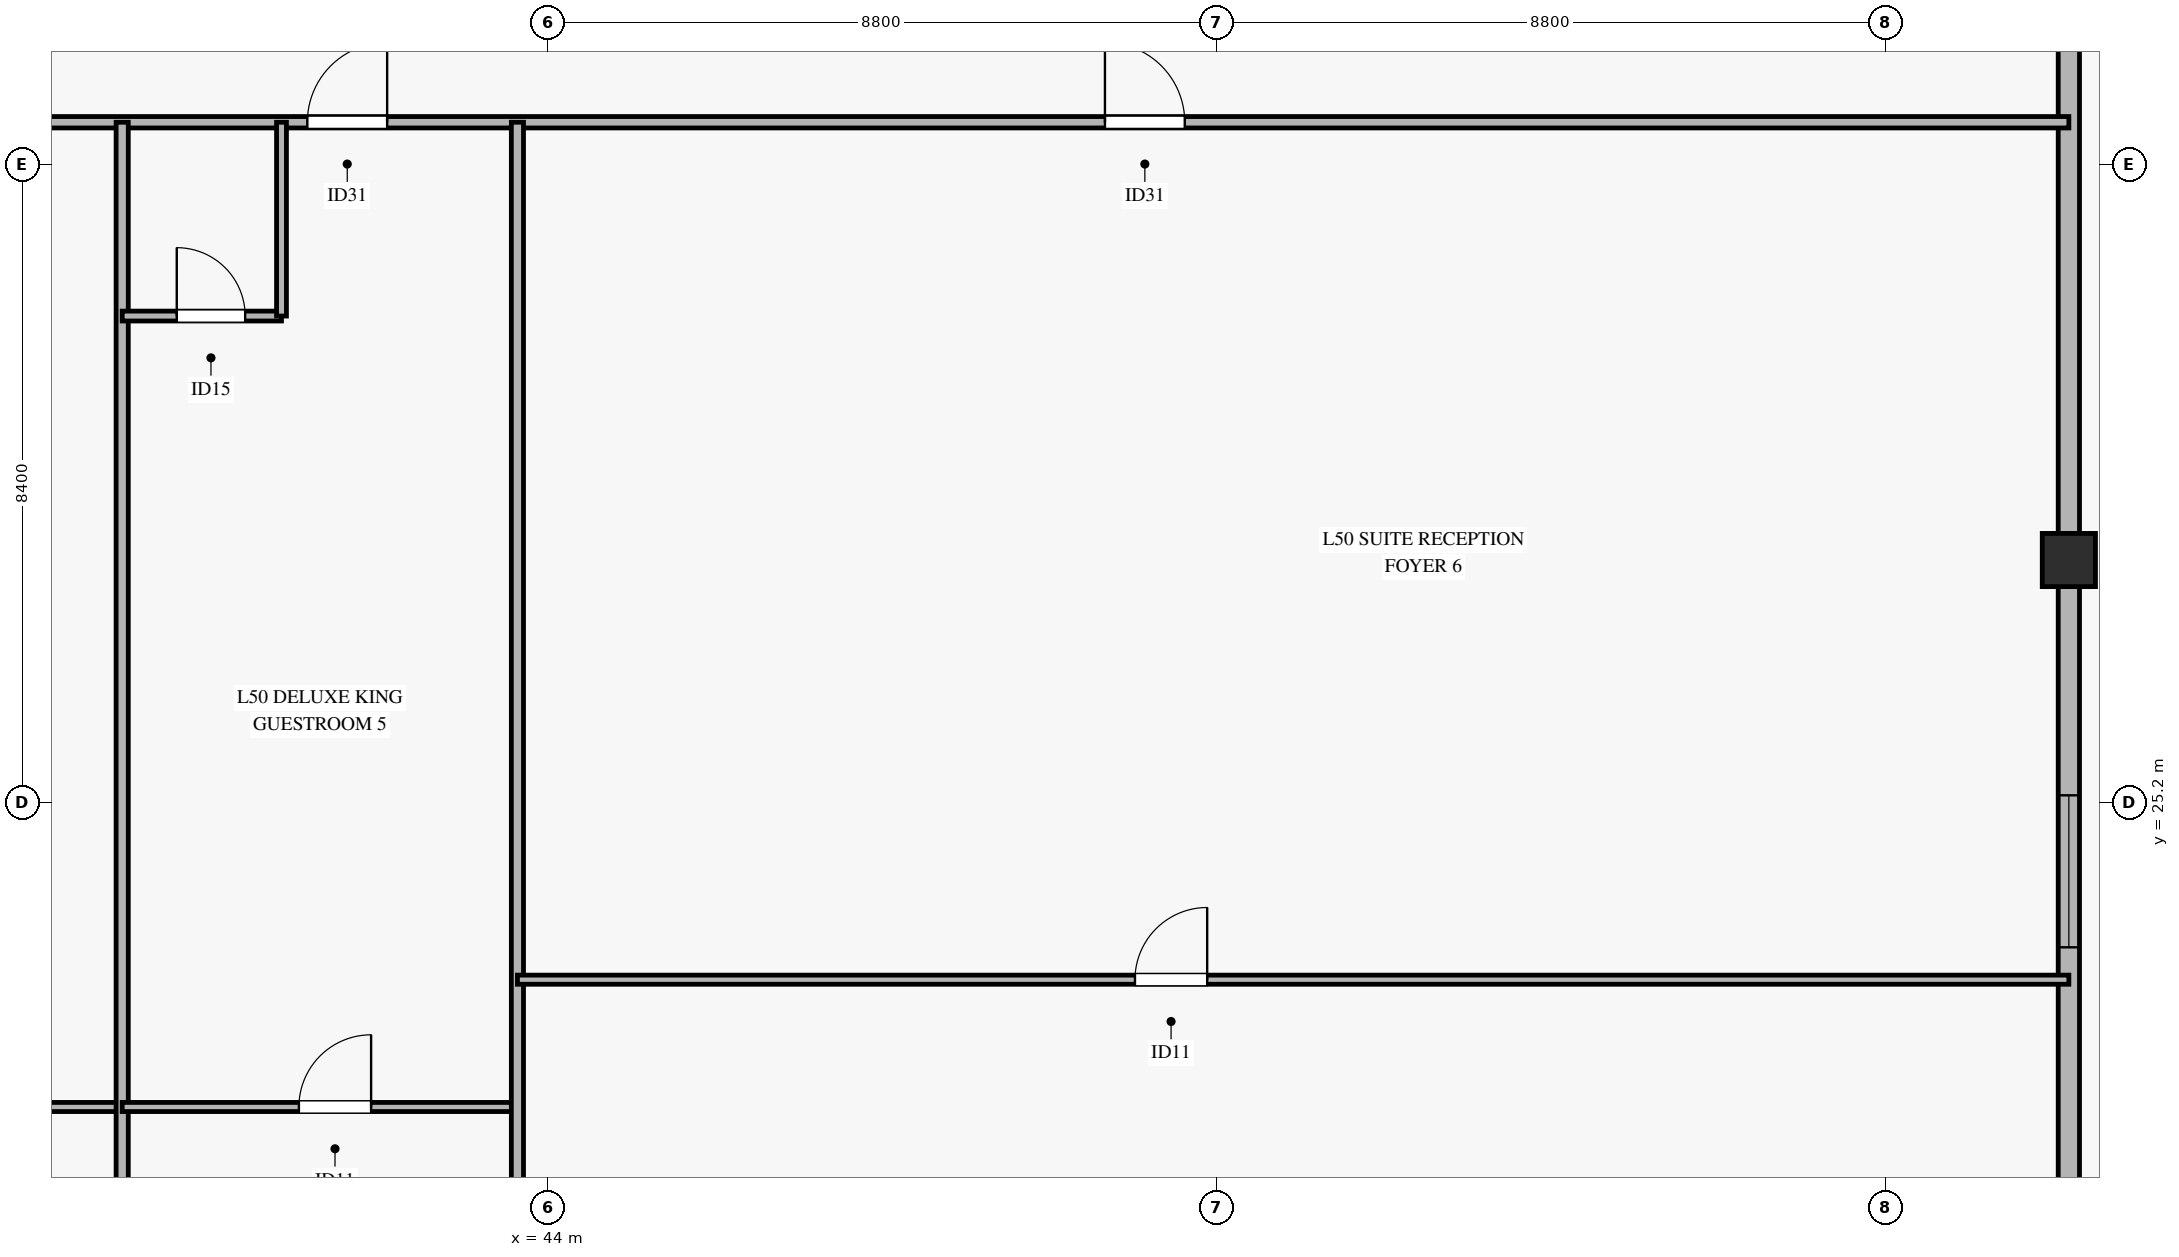
"""IFC4 building model, lengths in metres.
Left out: names, types, materials, properties, quantities, classifications, styles, units other than length and angle.
Written with IfcOpenShell. Run it as: python <this file> out.ifc"""

import sys

from ifc_helpers import new_model, si_unit, direction, frame, frame_2d, origin, origin_2d, place, context, subcontext, project, spatial, rectangle, hollow_rectangle, extrude, source, transform, mapped, element, fill, save


model = new_model("IFC4")
c1 = context("Model", 3, precision=1e-05, world=origin(), true_north=direction((0.0, 1.0)))
c2 = subcontext(c1, "Body", "Model", "MODEL_VIEW")
j1 = project(units=[si_unit("LENGTHUNIT", "METRE"), si_unit("PLANEANGLEUNIT", "RADIAN")], contexts=[c1])
p1 = place(None, origin())
s1 = spatial("IfcSite", under=j1, at=p1, CompositionType="ELEMENT")
p2 = place(p1, origin())
s2 = spatial("IfcBuilding", under=s1, at=p2, CompositionType="ELEMENT")
p3 = place(p2, frame((0.0, 0.0, 199.2)))
s3 = spatial("IfcBuildingStorey", under=s2, at=p3, CompositionType="ELEMENT", Elevation=199.2)
m1 = source(origin(), c2, "Body", "SweptSolid", [
    extrude(hollow_rectangle(XDim=0.7, YDim=0.7, WallThickness=0.032, at=origin_2d()), origin(), (0.0, 0.0, 1.0), 3.304),
])
p4 = place(p3, frame((64.012, 28.39, 0.0), z_axis=(-0.095026488821, 0.106849380121, 0.989723787928), x_axis=(-0.747238227779, -0.664556266199, 0.0)))
e1 = element("IfcColumn", 1, at=p4, inside=s3, PredefinedType="COLUMN", context=c2, shape_type="MappedRepresentation", body=[
    mapped(m1, transform((0.0, 0.0, 0.0), x_axis=(1.0, 0.0, 0.0), y_axis=(0.0, 1.0, 0.0), z_axis=(0.0, 0.0, 1.0), scale=1.0)),
])
p5 = place(p3, frame((64.012, 13.515, 0.0), z_axis=(0.0, 0.0, 1.0), x_axis=(0.0, 1.0, 0.0)))
e2 = element("IfcWall", 2, at=p5, inside=s3, PredefinedType="SOLIDWALL", context=c2, shape_type="SweptSolid", body=[
    extrude(rectangle(XDim=14.525, YDim=0.28, at=frame_2d((7.263, 0.0))), origin(), (0.0, 0.0, 1.0), 2.75),
])
p6 = place(p5, frame((3.017, 0.0, 0.45)))
e3 = element("IfcOpeningElement", 3, at=p6, cuts=e2, PredefinedType="OPENING", context=c2, shape_type="SweptSolid", body=[
    extrude(rectangle(XDim=2.0, YDim=2.0, at=frame_2d((1.0, 1.0))), frame((0.0, 0.15, 0.0), z_axis=(0.0, -1.0, 0.0), x_axis=(1.0, 0.0, 0.0)), (0.0, 0.0, 1.0), 0.3),
])
p7 = place(p5, frame((9.779, 0.0, 0.45)))
e4 = element("IfcOpeningElement", 4, at=p7, cuts=e2, PredefinedType="OPENING", context=c2, shape_type="SweptSolid", body=[
    extrude(rectangle(XDim=2.0, YDim=2.0, at=frame_2d((1.0, 1.0))), frame((0.0, 0.15, 0.0), z_axis=(0.0, -1.0, 0.0), x_axis=(1.0, 0.0, 0.0)), (0.0, 0.0, 1.0), 0.3),
])
p8 = place(p3, frame((64.012, 28.74, 0.0), z_axis=(0.0, 0.0, 1.0), x_axis=(0.0, 1.0, 0.0)))
e5 = element("IfcWall", 5, at=p8, inside=s3, PredefinedType="SOLIDWALL", context=c2, shape_type="SweptSolid", body=[
    extrude(rectangle(XDim=14.525, YDim=0.28, at=frame_2d((7.262, 0.0))), origin(), (0.0, 0.0, 1.0), 2.75),
])
p9 = place(p8, frame((9.115, 0.0, 0.45)))
e6 = element("IfcOpeningElement", 6, at=p9, cuts=e5, PredefinedType="OPENING", context=c2, shape_type="SweptSolid", body=[
    extrude(rectangle(XDim=2.0, YDim=2.0, at=frame_2d((1.0, 1.0))), frame((0.0, 0.15, 0.0), z_axis=(0.0, -1.0, 0.0), x_axis=(1.0, 0.0, 0.0)), (0.0, 0.0, 1.0), 0.3),
])
p10 = place(p3, frame((6.389, 34.15, 0.0), z_axis=(0.0, 0.0, 1.0), x_axis=(1.0, 0.0, 0.0)))
e7 = element("IfcWall", 7, at=p10, inside=s3, PredefinedType="PARTITIONING", context=c2, shape_type="SweptSolid", body=[
    extrude(rectangle(XDim=57.623, YDim=0.15, at=frame_2d((28.812, 0.0))), origin(), (0.0, 0.0, 1.0), 2.455),
])
p11 = place(p10, frame((6.344, 0.0, 0.0)))
e8 = element("IfcOpeningElement", 8, at=p11, cuts=e7, PredefinedType="OPENING", context=c2, shape_type="SweptSolid", body=[
    extrude(rectangle(XDim=1.05, YDim=2.15, at=frame_2d((0.525, 1.075))), frame((0.0, 0.085, 0.0), z_axis=(0.0, -1.0, 0.0), x_axis=(1.0, 0.0, 0.0)), (0.0, 0.0, 1.0), 0.17),
])
p12 = place(p10, frame((17.936, 0.0, 0.0)))
e9 = element("IfcOpeningElement", 9, at=p12, cuts=e7, PredefinedType="OPENING", context=c2, shape_type="SweptSolid", body=[
    extrude(rectangle(XDim=1.05, YDim=2.15, at=frame_2d((0.525, 1.075))), frame((0.0, 0.085, 0.0), z_axis=(0.0, -1.0, 0.0), x_axis=(1.0, 0.0, 0.0)), (0.0, 0.0, 1.0), 0.17),
])
p13 = place(p10, frame((23.756, 0.0, 0.0)))
e10 = element("IfcOpeningElement", 10, at=p13, cuts=e7, PredefinedType="OPENING", context=c2, shape_type="SweptSolid", body=[
    extrude(rectangle(XDim=1.05, YDim=2.15, at=frame_2d((0.525, 1.075))), frame((0.0, 0.085, 0.0), z_axis=(0.0, -1.0, 0.0), x_axis=(1.0, 0.0, 0.0)), (0.0, 0.0, 1.0), 0.17),
])
p14 = place(p10, frame((29.247, 0.0, 0.0)))
e11 = element("IfcOpeningElement", 11, at=p14, cuts=e7, PredefinedType="OPENING", context=c2, shape_type="SweptSolid", body=[
    extrude(rectangle(XDim=1.05, YDim=2.15, at=frame_2d((0.525, 1.075))), frame((0.0, 0.085, 0.0), z_axis=(0.0, -1.0, 0.0), x_axis=(1.0, 0.0, 0.0)), (0.0, 0.0, 1.0), 0.17),
])
p15 = place(p10, frame((34.447, 0.0, 0.0)))
e12 = element("IfcOpeningElement", 12, at=p15, cuts=e7, PredefinedType="OPENING", context=c2, shape_type="SweptSolid", body=[
    extrude(rectangle(XDim=1.05, YDim=2.15, at=frame_2d((0.525, 1.075))), frame((0.0, 0.085, 0.0), z_axis=(0.0, -1.0, 0.0), x_axis=(1.0, 0.0, 0.0)), (0.0, 0.0, 1.0), 0.17),
])
p16 = place(p10, frame((44.941, 0.0, 0.0)))
e13 = element("IfcOpeningElement", 13, at=p16, cuts=e7, PredefinedType="OPENING", context=c2, shape_type="SweptSolid", body=[
    extrude(rectangle(XDim=1.05, YDim=2.15, at=frame_2d((0.525, 1.075))), frame((0.0, 0.085, 0.0), z_axis=(0.0, -1.0, 0.0), x_axis=(1.0, 0.0, 0.0)), (0.0, 0.0, 1.0), 0.17),
])
p17 = place(p3, frame((33.2, 21.193, 0.0), z_axis=(0.0, 0.0, 1.0), x_axis=(1.0, 0.0, 0.0)))
e14 = element("IfcWall", 14, at=p17, inside=s3, PredefinedType="PARTITIONING", context=c2, shape_type="SweptSolid", body=[
    extrude(rectangle(XDim=5.2, YDim=0.12, at=frame_2d((2.6, 0.0))), origin(), (0.0, 0.0, 1.0), 2.455),
])
p18 = place(p17, frame((2.325, 0.0, 0.0)))
e15 = element("IfcOpeningElement", 15, at=p18, cuts=e14, PredefinedType="OPENING", context=c2, shape_type="SweptSolid", body=[
    extrude(rectangle(XDim=0.95, YDim=2.1, at=frame_2d((0.475, 1.05))), frame((0.0, 0.07, 0.0), z_axis=(0.0, -1.0, 0.0), x_axis=(1.0, 0.0, 0.0)), (0.0, 0.0, 1.0), 0.14),
])
p19 = place(p3, frame((38.4, 10.68, 0.0), z_axis=(0.0, 0.0, 1.0), x_axis=(0.0, 1.0, 0.0)))
e16 = element("IfcWall", 16, at=p19, inside=s3, PredefinedType="PARTITIONING", context=c2, shape_type="SweptSolid", body=[
    extrude(rectangle(XDim=23.47, YDim=0.16, at=frame_2d((11.735, 0.0))), origin(), (0.0, 0.0, 1.0), 2.755),
])
p20 = place(p3, frame((38.4, 31.6, 0.0), z_axis=(0.0, 0.0, 1.0), x_axis=(1.0, 0.0, 0.0)))
e17 = element("IfcWall", 17, at=p20, inside=s3, PredefinedType="PARTITIONING", context=c2, shape_type="SweptSolid", body=[
    extrude(rectangle(XDim=2.096, YDim=0.13, at=frame_2d((1.048, 0.0))), origin(), (0.0, 0.0, 1.0), 3.27),
])
p21 = place(p20, frame((0.718, 0.0, 0.0)))
e18 = element("IfcOpeningElement", 18, at=p21, cuts=e17, PredefinedType="OPENING", context=c2, shape_type="SweptSolid", body=[
    extrude(rectangle(XDim=0.9, YDim=2.1, at=frame_2d((0.45, 1.05))), frame((0.0, 0.075, 0.0), z_axis=(0.0, -1.0, 0.0), x_axis=(1.0, 0.0, 0.0)), (0.0, 0.0, 1.0), 0.15),
])
p22 = place(p3, frame((40.496, 31.6, 0.0), z_axis=(0.0, 0.0, 1.0), x_axis=(0.0, 1.0, 0.0)))
e19 = element("IfcWall", 19, at=p22, inside=s3, PredefinedType="PARTITIONING", context=c2, shape_type="SweptSolid", body=[
    extrude(rectangle(XDim=2.55, YDim=0.13, at=frame_2d((1.275, 0.0))), origin(), (0.0, 0.0, 1.0), 2.805),
])
p23 = place(p3, frame((38.4, 21.193, 0.0), z_axis=(0.0, 0.0, 1.0), x_axis=(1.0, 0.0, 0.0)))
e20 = element("IfcWall", 20, at=p23, inside=s3, PredefinedType="PARTITIONING", context=c2, shape_type="SweptSolid", body=[
    extrude(rectangle(XDim=5.2, YDim=0.12, at=frame_2d((2.6, 0.0))), origin(), (0.0, 0.0, 1.0), 3.27),
])
p24 = place(p23, frame((2.325, 0.0, 0.0)))
e21 = element("IfcOpeningElement", 21, at=p24, cuts=e20, PredefinedType="OPENING", context=c2, shape_type="SweptSolid", body=[
    extrude(rectangle(XDim=0.95, YDim=2.1, at=frame_2d((0.475, 1.05))), frame((0.0, 0.07, 0.0), z_axis=(0.0, -1.0, 0.0), x_axis=(1.0, 0.0, 0.0)), (0.0, 0.0, 1.0), 0.14),
])
p25 = place(p3, frame((43.6, 10.68, 0.0), z_axis=(0.0, 0.0, 1.0), x_axis=(0.0, 1.0, 0.0)))
e22 = element("IfcWall", 22, at=p25, inside=s3, PredefinedType="PARTITIONING", context=c2, shape_type="SweptSolid", body=[
    extrude(rectangle(XDim=23.47, YDim=0.16, at=frame_2d((11.735, 0.0))), origin(), (0.0, 0.0, 1.0), 2.755),
])
p26 = place(p3, frame((43.6, 22.868, 0.0), z_axis=(0.0, 0.0, 1.0), x_axis=(1.0, 0.0, 0.0)))
e23 = element("IfcWall", 23, at=p26, inside=s3, PredefinedType="PARTITIONING", context=c2, shape_type="SweptSolid", body=[
    extrude(rectangle(XDim=20.412, YDim=0.12, at=frame_2d((10.206, 0.0))), origin(), (0.0, 0.0, 1.0), 2.455),
])
p27 = place(p26, frame((8.125, 0.0, 0.0)))
e24 = element("IfcOpeningElement", 24, at=p27, cuts=e23, PredefinedType="OPENING", context=c2, shape_type="SweptSolid", body=[
    extrude(rectangle(XDim=0.95, YDim=2.1, at=frame_2d((0.475, 1.05))), frame((0.0, 0.07, 0.0), z_axis=(0.0, -1.0, 0.0), x_axis=(1.0, 0.0, 0.0)), (0.0, 0.0, 1.0), 0.14),
])
m2 = source(origin(), c2, "Body", "SweptSolid", [
    extrude(rectangle(XDim=2.0, YDim=2.0, at=frame_2d((1.0, 1.0))), frame((0.0, 0.03, 0.0), z_axis=(0.0, -1.0, 0.0), x_axis=(1.0, 0.0, 0.0)), (0.0, 0.0, 1.0), 0.06),
])
p28 = place(p7, origin())
e25 = element("IfcWindow", 25, at=p28, inside=s3, PartitioningType="SINGLE_PANEL", PredefinedType="WINDOW", context=c2, shape_type="MappedRepresentation", body=[
    mapped(m2, transform((0.0, 0.0, 0.0), x_axis=(1.0, 0.0, 0.0), y_axis=(0.0, 1.0, 0.0), z_axis=(0.0, 0.0, 1.0), scale=1.0)),
])
fill(e4, e25)
m3 = source(origin(), c2, "Body", "SweptSolid", [
    extrude(rectangle(XDim=1.05, YDim=2.15, at=frame_2d((0.525, 1.075))), frame((0.0, 0.025, 0.0), z_axis=(0.0, -1.0, 0.0), x_axis=(1.0, 0.0, 0.0)), (0.0, 0.0, 1.0), 0.05),
])
p29 = place(p15, origin())
e26 = element("IfcDoor", 26, at=p29, inside=s3, OperationType="SINGLE_SWING_RIGHT", PredefinedType="DOOR", context=c2, shape_type="MappedRepresentation", body=[
    mapped(m3, transform((0.0, 0.0, 0.0), x_axis=(1.0, 0.0, 0.0), y_axis=(0.0, 1.0, 0.0), z_axis=(0.0, 0.0, 1.0), scale=1.0)),
])
fill(e12, e26)
m4 = source(origin(), c2, "Body", "SweptSolid", [
    extrude(rectangle(XDim=0.9, YDim=2.1, at=frame_2d((0.45, 1.05))), frame((0.0, 0.025, 0.0), z_axis=(0.0, -1.0, 0.0), x_axis=(1.0, 0.0, 0.0)), (0.0, 0.0, 1.0), 0.05),
])
p30 = place(p21, origin())
e27 = element("IfcDoor", 27, at=p30, inside=s3, OperationType="SINGLE_SWING_LEFT", PredefinedType="DOOR", context=c2, shape_type="MappedRepresentation", body=[
    mapped(m4, transform((0.0, 0.0, 0.0), x_axis=(1.0, 0.0, 0.0), y_axis=(0.0, 1.0, 0.0), z_axis=(0.0, 0.0, 1.0), scale=1.0)),
])
fill(e18, e27)
m5 = source(origin(), c2, "Body", "SweptSolid", [
    extrude(rectangle(XDim=0.95, YDim=2.1, at=frame_2d((0.475, 1.05))), frame((0.0, 0.025, 0.0), z_axis=(0.0, -1.0, 0.0), x_axis=(1.0, 0.0, 0.0)), (0.0, 0.0, 1.0), 0.05),
])
p31 = place(p24, origin())
e28 = element("IfcDoor", 28, at=p31, inside=s3, OperationType="SINGLE_SWING_RIGHT", PredefinedType="DOOR", context=c2, shape_type="MappedRepresentation", body=[
    mapped(m5, transform((0.0, 0.0, 0.0), x_axis=(1.0, 0.0, 0.0), y_axis=(0.0, 1.0, 0.0), z_axis=(0.0, 0.0, 1.0), scale=1.0)),
])
fill(e21, e28)
p32 = place(p16, origin())
e29 = element("IfcDoor", 29, at=p32, inside=s3, OperationType="SINGLE_SWING_LEFT", PredefinedType="DOOR", context=c2, shape_type="MappedRepresentation", body=[
    mapped(m3, transform((0.0, 0.0, 0.0), x_axis=(1.0, 0.0, 0.0), y_axis=(0.0, 1.0, 0.0), z_axis=(0.0, 0.0, 1.0), scale=1.0)),
])
fill(e13, e29)
p33 = place(p27, origin())
e30 = element("IfcDoor", 30, at=p33, inside=s3, OperationType="SINGLE_SWING_RIGHT", PredefinedType="DOOR", context=c2, shape_type="MappedRepresentation", body=[
    mapped(m5, transform((0.0, 0.0, 0.0), x_axis=(1.0, 0.0, 0.0), y_axis=(0.0, 1.0, 0.0), z_axis=(0.0, 0.0, 1.0), scale=1.0)),
])
fill(e24, e30)
save(model, sys.argv[1])
